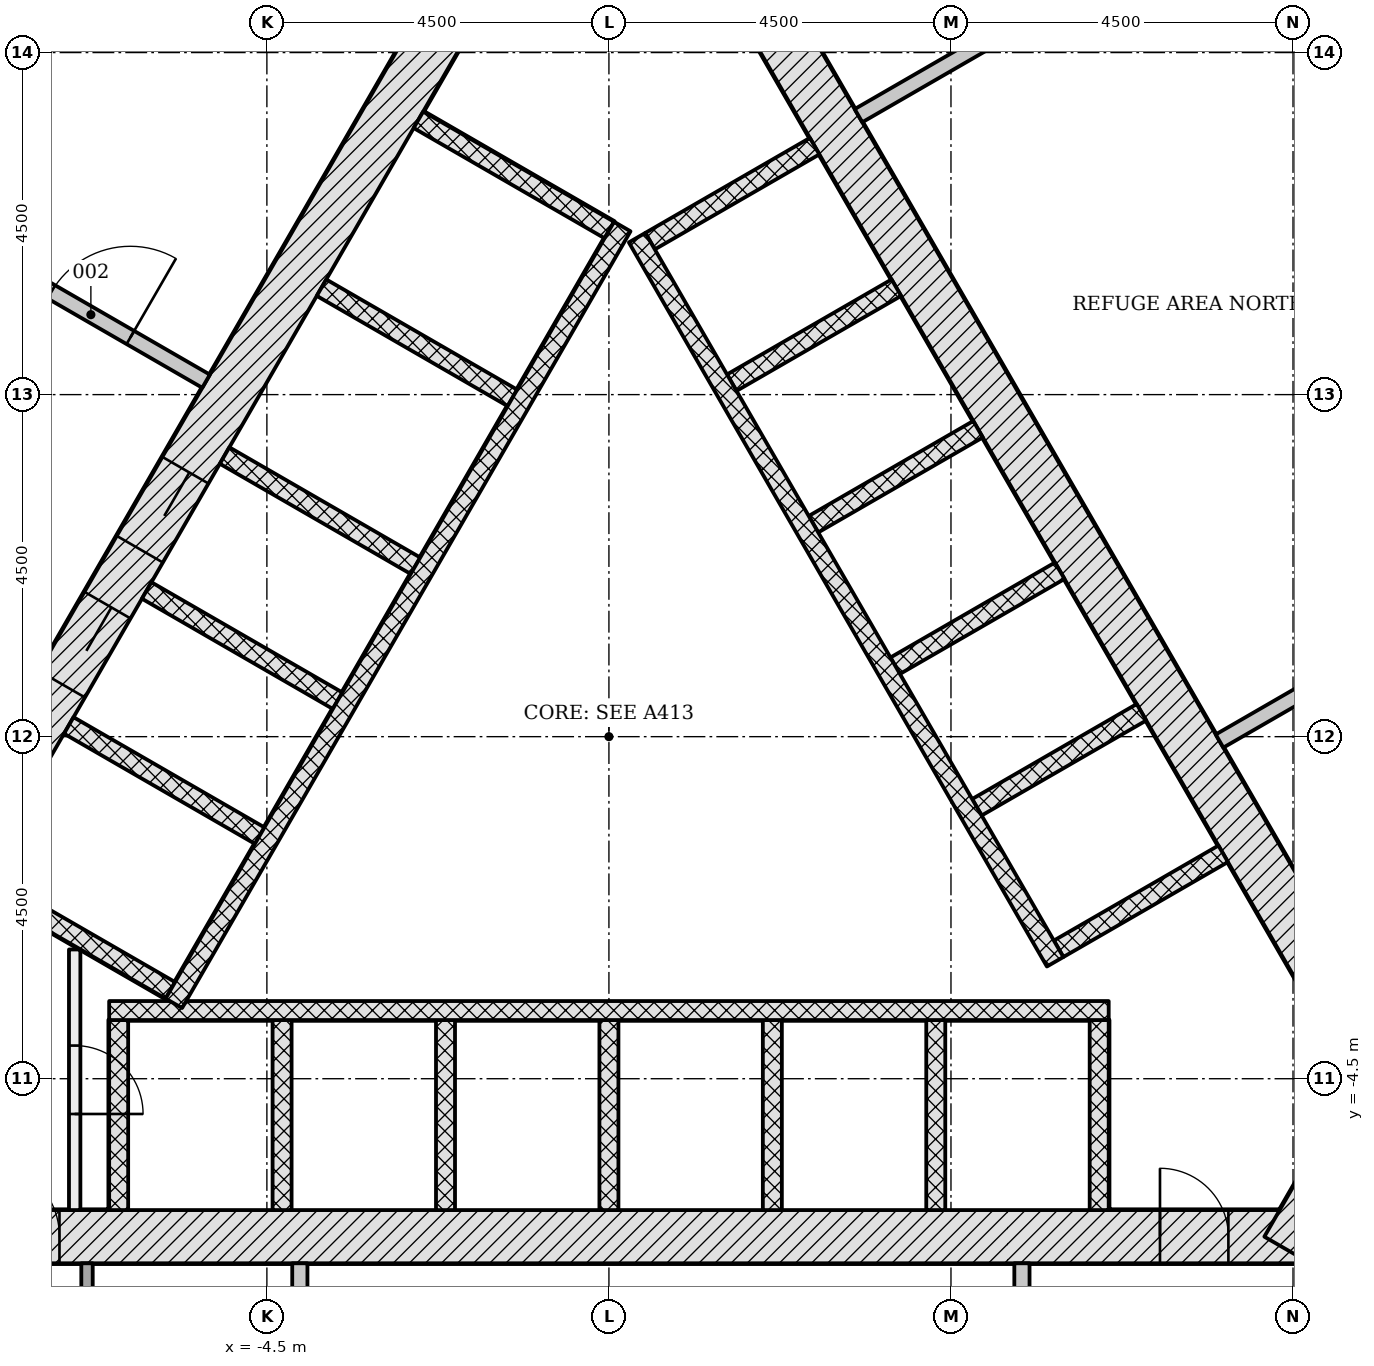
"""IFC4 building model, lengths in metres.
Left out: names, types, materials, properties, quantities, classifications, styles, units other than length and angle.
Written with IfcOpenShell. Run it as: python <this file> out.ifc"""

import sys

from ifc_helpers import new_model, si_unit, direction, frame, frame_2d, origin, place, context, subcontext, project, spatial, rectangle, extrude, element, fill, save


model = new_model("IFC4")
c1 = context("Model", 3, precision=1e-05, world=origin(), true_north=direction((0.0, 1.0)))
c2 = subcontext(c1, "Body", "Model", "MODEL_VIEW")
j1 = project(units=[si_unit("LENGTHUNIT", "METRE"), si_unit("PLANEANGLEUNIT", "RADIAN")], contexts=[c1])
p1 = place(None, origin())
s1 = spatial("IfcSite", under=j1, at=p1, CompositionType="ELEMENT")
p2 = place(p1, origin())
s2 = spatial("IfcBuilding", under=s1, at=p2, CompositionType="ELEMENT")
p3 = place(p2, frame((0.0, 0.0, 127.5)))
s3 = spatial("IfcBuildingStorey", under=s2, at=p3, CompositionType="ELEMENT", Elevation=127.5)
p4 = place(p3, frame((-9.229, -6.578, -0.3), z_axis=(0.0, 0.0, 1.0), x_axis=(1.0, 0.0, 0.0)))
e1 = element("IfcWall", 1, at=p4, inside=s3, PredefinedType="SHEAR", context=c2, shape_type="SweptSolid", body=[
    extrude(rectangle(XDim=18.458, YDim=0.7, at=frame_2d((9.229, 0.0))), origin(), (0.0, 0.0, 1.0), 7.2),
])
p5 = place(p4, frame((1.0, 0.0, 0.3)))
e2 = element("IfcOpeningElement", 2, at=p5, cuts=e1, PredefinedType="OPENING", context=c2, shape_type="SweptSolid", body=[
    extrude(rectangle(XDim=1.0, YDim=2.1, at=frame_2d((0.5, 1.05))), frame((0.0, 0.36, 0.0), z_axis=(0.0, -1.0, 0.0), x_axis=(1.0, 0.0, 0.0)), (0.0, 0.0, 1.0), 0.72),
])
p6 = place(p4, frame((16.479, 0.0, 0.3)))
e3 = element("IfcOpeningElement", 3, at=p6, cuts=e1, PredefinedType="OPENING", context=c2, shape_type="SweptSolid", body=[
    extrude(rectangle(XDim=0.9, YDim=2.1, at=frame_2d((0.45, 1.05))), frame((0.0, 0.36, 0.0), z_axis=(0.0, -1.0, 0.0), x_axis=(1.0, 0.0, 0.0)), (0.0, 0.0, 1.0), 0.72),
])
p7 = place(p3, frame((8.926, -6.753, -0.3), z_axis=(0.0, 0.0, 1.0), x_axis=(0.500042739161, 0.866000726912, 0.0)))
e4 = element("IfcWall", 4, at=p7, inside=s3, PredefinedType="SHEAR", context=c2, shape_type="SweptSolid", body=[
    extrude(rectangle(XDim=2.771, YDim=0.7, at=frame_2d((1.386, 0.0))), origin(), (0.0, 0.0, 1.0), 7.2),
])
p8 = place(p3, frame((10.311, -4.703, -0.3), z_axis=(0.0, 0.0, 1.0), x_axis=(-0.500001446645, 0.866024568562, 0.0)))
e5 = element("IfcWall", 5, at=p8, inside=s3, PredefinedType="SHEAR", context=c2, shape_type="SweptSolid", body=[
    extrude(rectangle(XDim=18.458, YDim=0.7, at=frame_2d((9.229, 0.0))), origin(), (0.0, 0.0, 1.0), 7.2),
])
p9 = place(p3, frame((-1.083, 11.281, -0.3), z_axis=(0.0, 0.0, 1.0), x_axis=(-0.500001446645, -0.866024568562, 0.0)))
e6 = element("IfcWall", 6, at=p9, inside=s3, PredefinedType="SHEAR", context=c2, shape_type="SweptSolid", body=[
    extrude(rectangle(XDim=18.458, YDim=0.7, at=frame_2d((9.229, 0.0))), origin(), (0.0, 0.0, 1.0), 7.2),
])
p10 = place(p9, frame((8.979, 0.0, 0.3)))
e7 = element("IfcOpeningElement", 7, at=p10, cuts=e6, PredefinedType="OPENING", context=c2, shape_type="SweptSolid", body=[
    extrude(rectangle(XDim=1.2, YDim=2.1, at=frame_2d((0.6, 1.05))), frame((0.0, 0.36, 0.0), z_axis=(0.0, -1.0, 0.0), x_axis=(1.0, 0.0, 0.0)), (0.0, 0.0, 1.0), 0.72),
])
p11 = place(p9, frame((11.029, 0.0, 0.3)))
e8 = element("IfcOpeningElement", 8, at=p11, cuts=e6, PredefinedType="OPENING", context=c2, shape_type="SweptSolid", body=[
    extrude(rectangle(XDim=1.2, YDim=2.1, at=frame_2d((0.6, 1.05))), frame((0.0, 0.36, 0.0), z_axis=(0.0, -1.0, 0.0), x_axis=(1.0, 0.0, 0.0)), (0.0, 0.0, 1.0), 0.72),
])
for number, where, z_axis, x_axis in (
    (9, (-6.45, -6.228, -0.3), (0.0, 0.0, 1.0), (0.0, 1.0, 0.0)),
    (10, (-4.3, -6.228, -0.3), (0.0, 0.0, 1.0), (0.0, 1.0, 0.0)),
    (11, (-2.15, -6.228, -0.3), (0.0, 0.0, 1.0), (0.0, 1.0, 0.0)),
    (12, (0.0, -6.228, -0.3), (0.0, 0.0, 1.0), (0.0, 1.0, 0.0)),
    (13, (2.15, -6.228, -0.3), (0.0, 0.0, 1.0), (0.0, 1.0, 0.0)),
    (14, (4.3, -6.228, -0.3), (0.0, 0.0, 1.0), (0.0, 1.0, 0.0)),
    (15, (6.45, -6.228, -0.3), (0.0, 0.0, 1.0), (0.0, 1.0, 0.0)),
):
    element("IfcWall", number, at=place(p3, frame(where, z_axis=z_axis, x_axis=x_axis)), inside=s3, PredefinedType="PARTITIONING", context=c2, shape_type="SweptSolid", body=[
        extrude(rectangle(XDim=2.5, YDim=0.25, at=frame_2d((1.25, 0.0))), origin(), (0.0, 0.0, 1.0), 7.2),
    ])
p12 = place(p3, frame((-6.575, -3.603, 0.0), z_axis=(0.0, 0.0, 1.0), x_axis=(1.0, 0.0, 0.0)))
e16 = element("IfcWall", 16, at=p12, inside=s3, PredefinedType="PARTITIONING", context=c2, shape_type="SweptSolid", body=[
    extrude(rectangle(XDim=13.15, YDim=0.25, at=frame_2d((6.575, 0.0))), origin(), (0.0, 0.0, 1.0), 6.9),
])
for number, where, z_axis, x_axis in (
    (17, (8.081, -1.541, 0.0), (0.0, 0.0, 1.0), (-0.866, -0.5, 0.0)),
    (18, (7.006, 0.321, 0.0), (0.0, 0.0, 1.0), (-0.866, -0.5, 0.0)),
):
    element("IfcWall", number, at=place(p3, frame(where, z_axis=z_axis, x_axis=x_axis)), inside=s3, PredefinedType="PARTITIONING", context=c2, shape_type="SweptSolid", body=[
        extrude(rectangle(XDim=2.5, YDim=0.25, at=frame_2d((1.25, 0.0))), origin(), (0.0, 0.0, 1.0), 6.9),
    ])
p13 = place(p3, frame((5.931, 2.183, 0.0), z_axis=(0.0, 0.0, 1.0), x_axis=(-0.866047370643, -0.499961950354, 0.0)))
e19 = element("IfcWall", 19, at=p13, inside=s3, PredefinedType="PARTITIONING", context=c2, shape_type="SweptSolid", body=[
    extrude(rectangle(XDim=2.5, YDim=0.25, at=frame_2d((1.25, 0.0))), origin(), (0.0, 0.0, 1.0), 6.9),
])
for number, where, z_axis, x_axis in (
    (20, (4.856, 4.045, 0.0), (0.0, 0.0, 1.0), (-0.866, -0.5, 0.0)),
    (21, (3.781, 5.907, 0.0), (0.0, 0.0, 1.0), (-0.866, -0.5, 0.0)),
    (22, (2.706, 7.769, 0.0), (0.0, 0.0, 1.0), (-0.866, -0.5, 0.0)),
):
    element("IfcWall", number, at=place(p3, frame(where, z_axis=z_axis, x_axis=x_axis)), inside=s3, PredefinedType="PARTITIONING", context=c2, shape_type="SweptSolid", body=[
        extrude(rectangle(XDim=2.5, YDim=0.25, at=frame_2d((1.25, 0.0))), origin(), (0.0, 0.0, 1.0), 6.9),
    ])
p14 = place(p3, frame((5.87, -2.961, 0.0), z_axis=(0.0, 0.0, 1.0), x_axis=(-0.50000615651, 0.866021849293, 0.0)))
e23 = element("IfcWall", 23, at=p14, inside=s3, PredefinedType="PARTITIONING", context=c2, shape_type="SweptSolid", body=[
    extrude(rectangle(XDim=11.0, YDim=0.25, at=frame_2d((5.5, 0.0))), origin(), (0.0, 0.0, 1.0), 6.9),
])
p15 = place(p3, frame((-2.506, 8.115, -0.3), z_axis=(0.0, 0.0, 1.0), x_axis=(0.865996321171, -0.50005036918, 0.0)))
e24 = element("IfcWall", 24, at=p15, inside=s3, PredefinedType="PARTITIONING", context=c2, shape_type="SweptSolid", body=[
    extrude(rectangle(XDim=2.9, YDim=0.25, at=frame_2d((1.45, 0.0))), origin(), (0.0, 0.0, 1.0), 7.2),
])
for number, where, z_axis, x_axis in (
    (25, (-3.781, 5.907, -0.3), (0.0, 0.0, 1.0), (0.866, -0.5, 0.0)),
    (26, (-5.056, 3.699, -0.3), (0.0, 0.0, 1.0), (0.866, -0.5, 0.0)),
    (27, (-6.081, 1.923, -0.3), (0.0, 0.0, 1.0), (0.866, -0.5, 0.0)),
    (28, (-7.106, 0.148, -0.3), (0.0, 0.0, 1.0), (0.866, -0.5, 0.0)),
    (29, (-8.281, -1.887, -0.3), (0.0, 0.0, 1.0), (0.866, -0.5, 0.0)),
):
    element("IfcWall", number, at=place(p3, frame(where, z_axis=z_axis, x_axis=x_axis)), inside=s3, PredefinedType="PARTITIONING", context=c2, shape_type="SweptSolid", body=[
        extrude(rectangle(XDim=2.9, YDim=0.25, at=frame_2d((1.45, 0.0))), origin(), (0.0, 0.0, 1.0), 7.2),
    ])
p16 = place(p3, frame((0.176, 6.711, 0.0), z_axis=(0.0, 0.0, 1.0), x_axis=(-0.500004227369, -0.866022963098, 0.0)))
e30 = element("IfcWall", 30, at=p16, inside=s3, PredefinedType="PARTITIONING", context=c2, shape_type="SweptSolid", body=[
    extrude(rectangle(XDim=11.8, YDim=0.25, at=frame_2d((5.9, 0.0))), origin(), (0.0, 0.0, 1.0), 6.9),
])
p17 = place(p3, frame((-7.029, -2.8, 0.0), z_axis=(0.0, 0.0, 1.0), x_axis=(0.0, -1.0, 0.0)))
e31 = element("IfcWall", 31, at=p17, inside=s3, PredefinedType="PARTITIONING", context=c2, shape_type="SweptSolid", body=[
    extrude(rectangle(XDim=3.428, YDim=0.15, at=frame_2d((1.714, 0.0))), origin(), (0.0, 0.0, 1.0), 6.9),
])
p18 = place(p17, frame((1.264, 0.0, 0.0)))
e32 = element("IfcOpeningElement", 32, at=p18, cuts=e31, PredefinedType="OPENING", context=c2, shape_type="SweptSolid", body=[
    extrude(rectangle(XDim=0.9, YDim=2.1, at=frame_2d((0.45, 1.05))), frame((0.0, 0.085, 0.0), z_axis=(0.0, -1.0, 0.0), x_axis=(1.0, 0.0, 0.0)), (0.0, 0.0, 1.0), 0.17),
])
p19 = place(p3, frame((7.44, -10.226, -0.3), z_axis=(0.0, 0.0, 1.0), x_axis=(0.500022077904, 0.866012656725, 0.0)))
e33 = element("IfcWall", 33, at=p19, inside=s3, PredefinedType="SHEAR", context=c2, shape_type="SweptSolid", body=[
    extrude(rectangle(XDim=3.55, YDim=0.2, at=frame_2d((1.775, 0.0))), origin(), (0.0, 0.0, 1.0), 7.2),
])
p20 = place(p19, frame((1.175, 0.0, 0.3)))
e34 = element("IfcOpeningElement", 34, at=p20, cuts=e33, PredefinedType="OPENING", context=c2, shape_type="SweptSolid", body=[
    extrude(rectangle(XDim=1.2, YDim=2.1, at=frame_2d((0.6, 1.05))), frame((0.0, 0.11, 0.0), z_axis=(0.0, -1.0, 0.0), x_axis=(1.0, 0.0, 0.0)), (0.0, 0.0, 1.0), 0.22),
])
p21 = place(p3, frame((-11.077, 8.012, 0.0), z_axis=(0.0, 0.0, 1.0), x_axis=(0.866022858982, -0.500004407701, 0.0)))
e35 = element("IfcWall", 35, at=p21, inside=s3, PredefinedType="PARTITIONING", context=c2, shape_type="SweptSolid", body=[
    extrude(rectangle(XDim=6.671, YDim=0.2, at=frame_2d((3.335, 0.0))), origin(), (0.0, 0.0, 1.0), 6.9),
])
p22 = place(p21, frame((4.321, 0.0, 0.0)))
e36 = element("IfcOpeningElement", 36, at=p22, cuts=e35, PredefinedType="OPENING", context=c2, shape_type="SweptSolid", body=[
    extrude(rectangle(XDim=1.2, YDim=2.1, at=frame_2d((0.6, 1.05))), frame((0.0, 0.11, 0.0), z_axis=(0.0, -1.0, 0.0), x_axis=(1.0, 0.0, 0.0)), (0.0, 0.0, 1.0), 0.22),
])
p23 = place(p3, frame((-6.291, 16.103, 0.0), z_axis=(0.0, 0.0, 1.0), x_axis=(-0.500015592816, -0.866016401081, 0.0)))
e37 = element("IfcWall", 37, at=p23, inside=s3, PredefinedType="PARTITIONING", context=c2, shape_type="SweptSolid", body=[
    extrude(rectangle(XDim=9.3, YDim=0.2, at=frame_2d((4.65, 0.0))), origin(), (0.0, 0.0, 1.0), 6.347),
])
p24 = place(p3, frame((5.434, -13.85, 0.0), z_axis=(0.0, 0.0, 1.0), x_axis=(0.0, 1.0, 0.0)))
e38 = element("IfcWall", 38, at=p24, inside=s3, PredefinedType="PARTITIONING", context=c2, shape_type="SweptSolid", body=[
    extrude(rectangle(XDim=6.922, YDim=0.2, at=frame_2d((3.461, 0.0))), origin(), (0.0, 0.0, 1.0), 6.9),
])
p25 = place(p24, frame((3.138, 0.0, 0.0)))
e39 = element("IfcOpeningElement", 39, at=p25, cuts=e38, PredefinedType="OPENING", context=c2, shape_type="SweptSolid", body=[
    extrude(rectangle(XDim=1.2, YDim=2.1, at=frame_2d((0.6, 1.05))), frame((0.0, 0.11, 0.0), z_axis=(0.0, -1.0, 0.0), x_axis=(1.0, 0.0, 0.0)), (0.0, 0.0, 1.0), 0.22),
])
p26 = place(p3, frame((-4.066, -13.399, 0.0), z_axis=(0.0, 0.0, 1.0), x_axis=(0.0, 1.0, 0.0)))
e40 = element("IfcWall", 40, at=p26, inside=s3, PredefinedType="PARTITIONING", context=c2, shape_type="SweptSolid", body=[
    extrude(rectangle(XDim=6.471, YDim=0.2, at=frame_2d((3.235, 0.0))), origin(), (0.0, 0.0, 1.0), 6.9),
])
p27 = place(p3, frame((3.283, 8.17, 0.0), z_axis=(0.0, 0.0, 1.0), x_axis=(0.866035807126, 0.499981980451, 0.0)))
e41 = element("IfcWall", 41, at=p27, inside=s3, PredefinedType="PARTITIONING", context=c2, shape_type="SweptSolid", body=[
    extrude(rectangle(XDim=6.922, YDim=0.2, at=frame_2d((3.461, 0.0))), origin(), (0.0, 0.0, 1.0), 6.9),
])
p28 = place(p27, frame((2.584, 0.0, 0.0)))
e42 = element("IfcOpeningElement", 42, at=p28, cuts=e41, PredefinedType="OPENING", context=c2, shape_type="SweptSolid", body=[
    extrude(rectangle(XDim=1.2, YDim=2.1, at=frame_2d((0.6, 1.05))), frame((0.0, 0.11, 0.0), z_axis=(0.0, -1.0, 0.0), x_axis=(1.0, 0.0, 0.0)), (0.0, 0.0, 1.0), 0.22),
])
p29 = place(p3, frame((9.024, 11.369, 0.0), z_axis=(0.0, 0.0, 1.0), x_axis=(0.499997557548, -0.86602681393, 0.0)))
e43 = element("IfcWall", 43, at=p29, inside=s3, PredefinedType="PARTITIONING", context=c2, shape_type="SweptSolid", body=[
    extrude(rectangle(XDim=9.5, YDim=0.2, at=frame_2d((4.75, 0.0))), origin(), (0.0, 0.0, 1.0), 6.347),
])
p30 = place(p3, frame((8.033, -0.058, 0.0), z_axis=(0.0, 0.0, 1.0), x_axis=(0.866017203851, 0.500014202433, 0.0)))
e44 = element("IfcWall", 44, at=p30, inside=s3, PredefinedType="PARTITIONING", context=c2, shape_type="SweptSolid", body=[
    extrude(rectangle(XDim=6.471, YDim=0.2, at=frame_2d((3.235, 0.0))), origin(), (0.0, 0.0, 1.0), 6.9),
])
p31 = place(p3, frame((-6.866, -6.928, 0.0), z_axis=(0.0, 0.0, 1.0), x_axis=(0.0, -1.0, 0.0)))
e45 = element("IfcWall", 45, at=p31, inside=s3, PredefinedType="PARTITIONING", context=c2, shape_type="SweptSolid", body=[
    extrude(rectangle(XDim=3.525, YDim=0.15, at=frame_2d((1.762, 0.0))), origin(), (0.0, 0.0, 1.0), 6.9),
])
p32 = place(p31, frame((2.394, 0.0, 0.0)))
e46 = element("IfcOpeningElement", 46, at=p32, cuts=e45, PredefinedType="OPENING", context=c2, shape_type="SweptSolid", body=[
    extrude(rectangle(XDim=1.0, YDim=2.1, at=frame_2d((0.5, 1.05))), frame((0.0, 0.085, 0.0), z_axis=(0.0, -1.0, 0.0), x_axis=(1.0, 0.0, 0.0)), (0.0, 0.0, 1.0), 0.17),
])
p33 = place(p10, origin())
e47 = element("IfcDoor", 47, at=p33, inside=s3, OperationType="DOUBLE_DOOR_SLIDING", PredefinedType="DOOR", context=c2, shape_type="SweptSolid", body=[
    extrude(rectangle(XDim=1.2, YDim=2.1, at=frame_2d((0.6, 1.05))), frame((0.0, 0.025, 0.0), z_axis=(0.0, -1.0, 0.0), x_axis=(1.0, 0.0, 0.0)), (0.0, 0.0, 1.0), 0.05),
])
fill(e7, e47)
p34 = place(p11, origin())
e48 = element("IfcDoor", 48, at=p34, inside=s3, OperationType="DOUBLE_DOOR_SLIDING", PredefinedType="DOOR", context=c2, shape_type="SweptSolid", body=[
    extrude(rectangle(XDim=1.2, YDim=2.1, at=frame_2d((0.6, 1.05))), frame((0.0, 0.025, 0.0), z_axis=(0.0, -1.0, 0.0), x_axis=(1.0, 0.0, 0.0)), (0.0, 0.0, 1.0), 0.05),
])
fill(e8, e48)
p35 = place(p5, origin())
e49 = element("IfcDoor", 49, at=p35, inside=s3, OperationType="SINGLE_SWING_LEFT", PredefinedType="DOOR", context=c2, shape_type="SweptSolid", body=[
    extrude(rectangle(XDim=1.0, YDim=2.1, at=frame_2d((0.5, 1.05))), frame((0.0, 0.075, 0.0), z_axis=(0.0, -1.0, 0.0), x_axis=(1.0, 0.0, 0.0)), (0.0, 0.0, 1.0), 0.15),
])
fill(e2, e49)
p36 = place(p6, origin())
e50 = element("IfcDoor", 50, at=p36, inside=s3, OperationType="SINGLE_SWING_LEFT", PredefinedType="DOOR", context=c2, shape_type="SweptSolid", body=[
    extrude(rectangle(XDim=0.9, YDim=2.1, at=frame_2d((0.45, 1.05))), frame((0.0, 0.075, 0.0), z_axis=(0.0, -1.0, 0.0), x_axis=(1.0, 0.0, 0.0)), (0.0, 0.0, 1.0), 0.15),
])
fill(e3, e50)
p37 = place(p18, origin())
e51 = element("IfcDoor", 51, at=p37, inside=s3, OperationType="SINGLE_SWING_RIGHT", PredefinedType="DOOR", context=c2, shape_type="SweptSolid", body=[
    extrude(rectangle(XDim=0.9, YDim=2.1, at=frame_2d((0.45, 1.05))), frame((0.0, 0.025, 0.0), z_axis=(0.0, -1.0, 0.0), x_axis=(1.0, 0.0, 0.0)), (0.0, 0.0, 1.0), 0.05),
])
fill(e32, e51)
p38 = place(p22, origin())
e52 = element("IfcDoor", 52, at=p38, inside=s3, OperationType="SINGLE_SWING_RIGHT", PredefinedType="DOOR", context=c2, shape_type="SweptSolid", body=[
    extrude(rectangle(XDim=1.2, YDim=2.1, at=frame_2d((0.6, 1.05))), frame((0.0, 0.025, 0.0), z_axis=(0.0, -1.0, 0.0), x_axis=(1.0, 0.0, 0.0)), (0.0, 0.0, 1.0), 0.05),
])
fill(e36, e52)
save(model, sys.argv[1])
